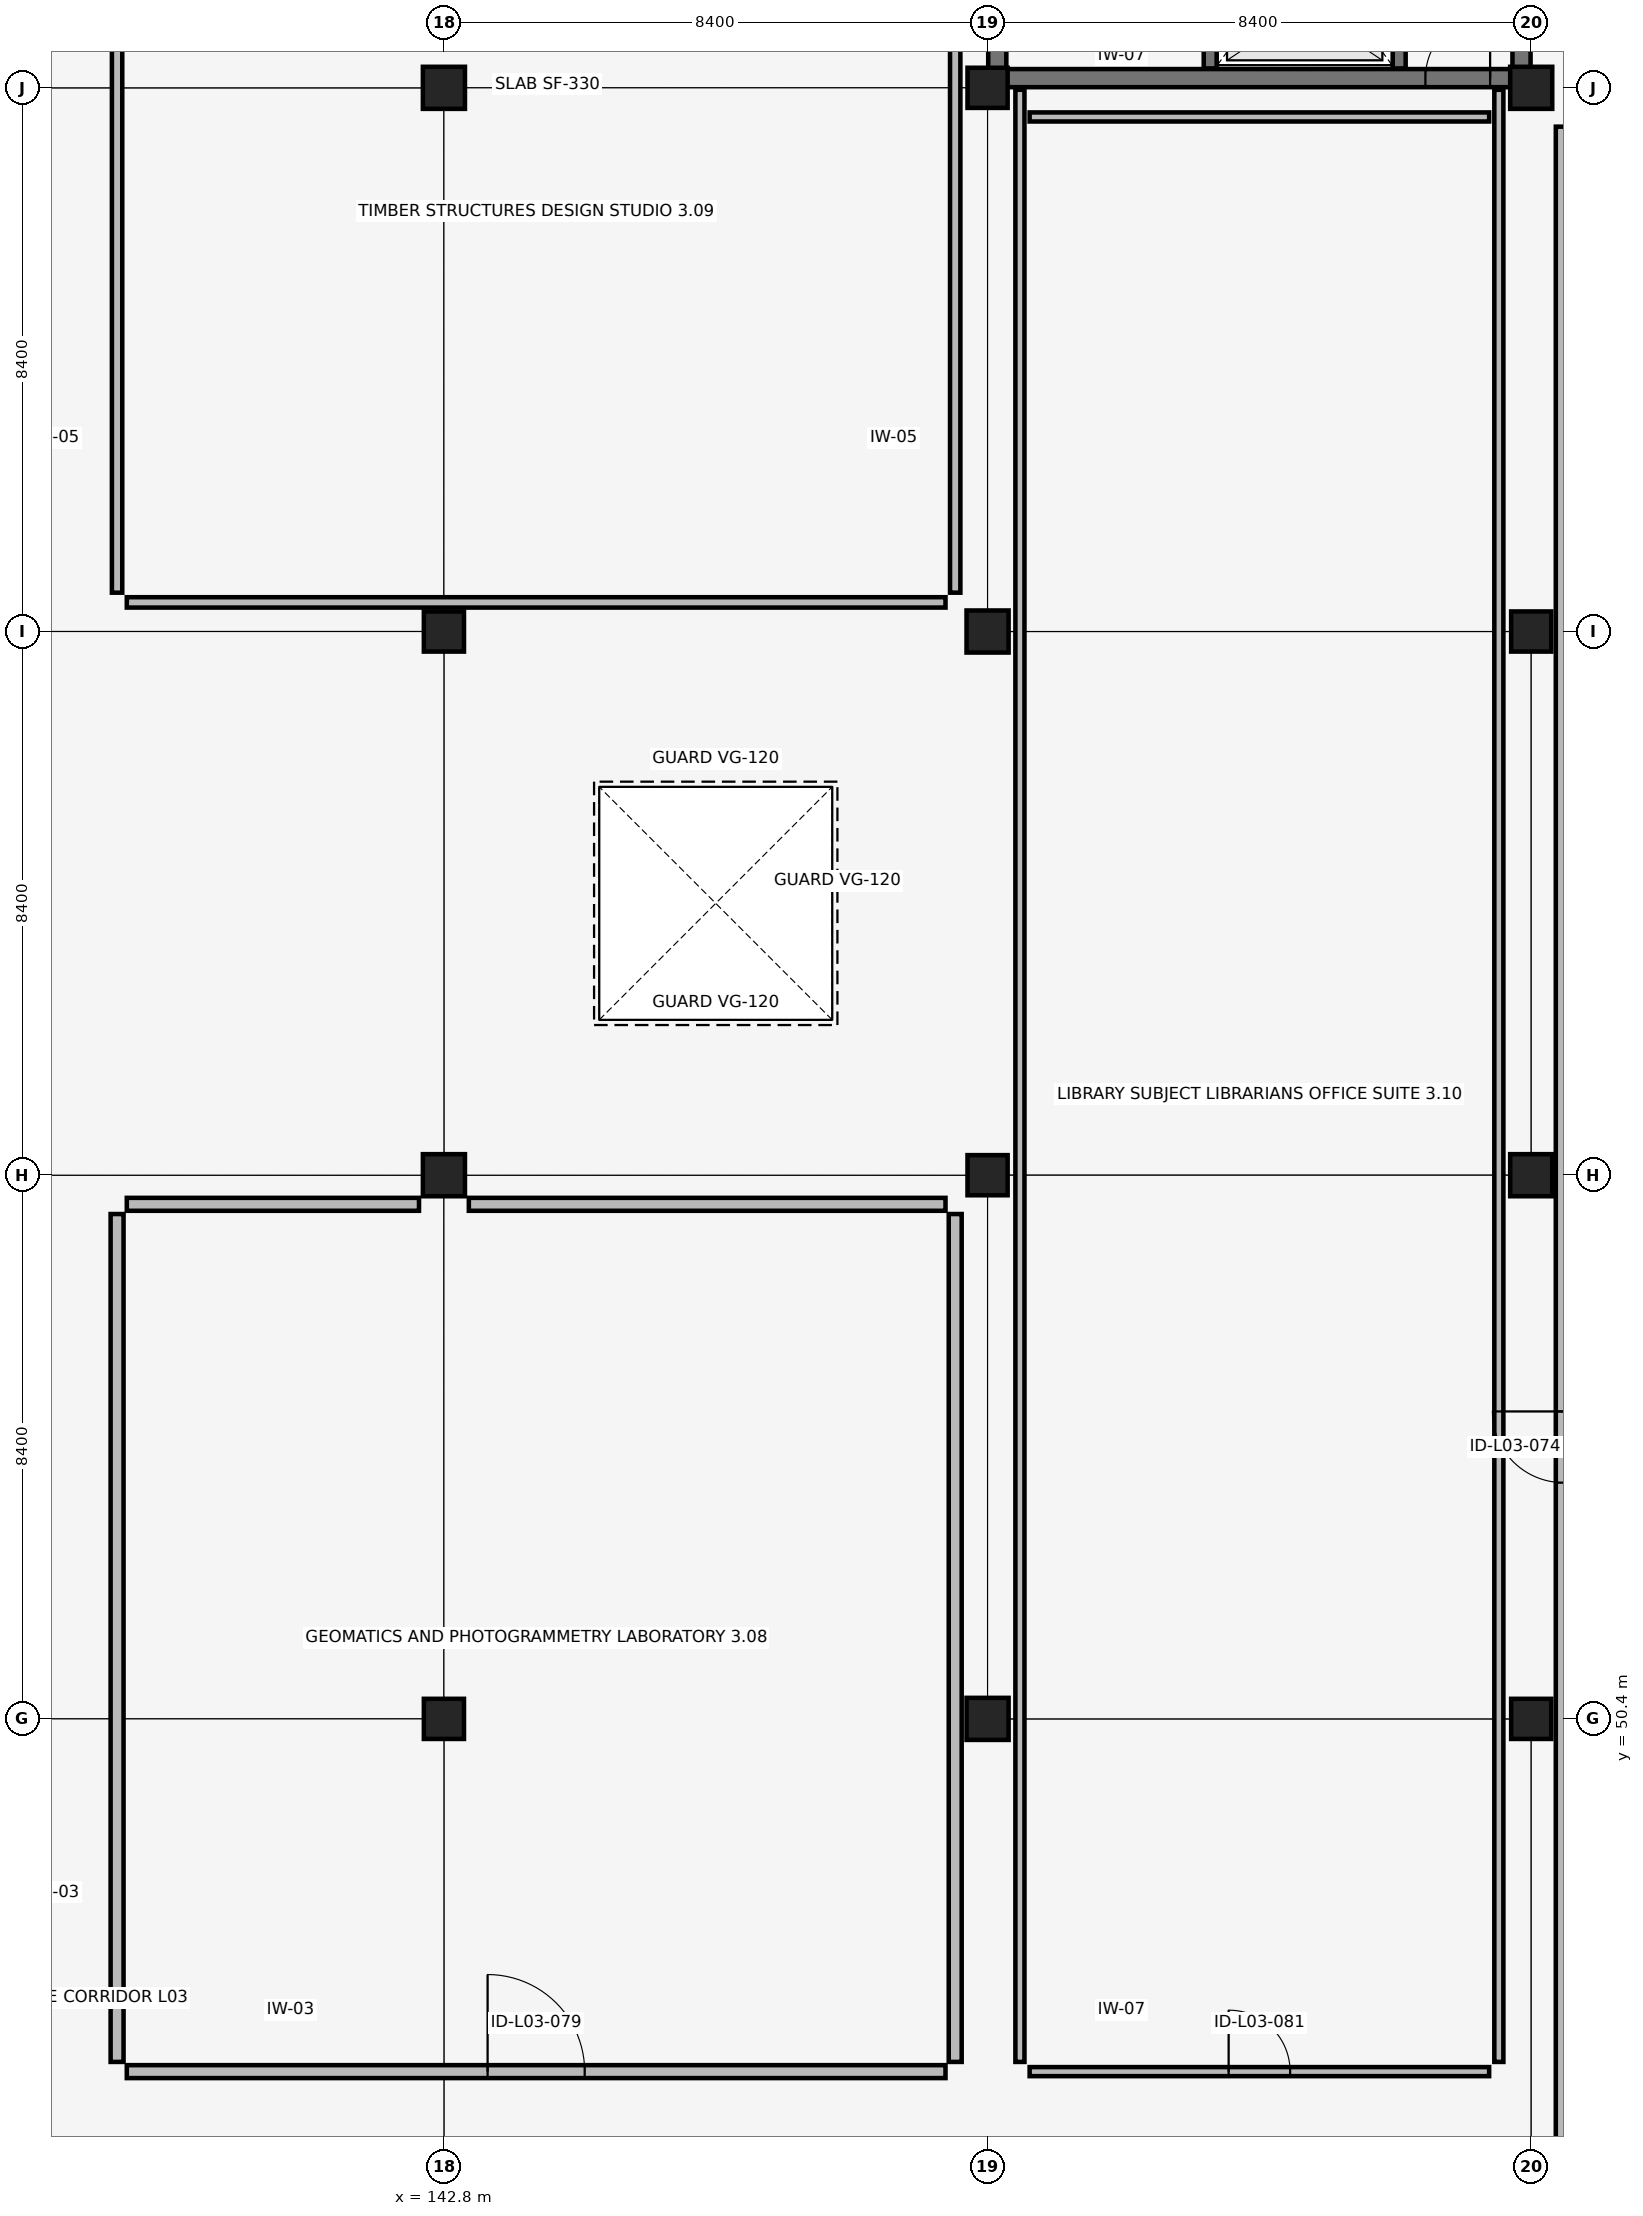
"""IFC4 building model, lengths in metres.
Left out: names, types, materials, properties, quantities, classifications, styles, units other than length and angle.
Written with IfcOpenShell. Run it as: python <this file> out.ifc"""

import sys

from ifc_helpers import new_model, si_unit, direction, frame, frame_2d, origin, origin_2d, place, context, subcontext, project, spatial, rectangle, extrude, element, fill, save


model = new_model("IFC4")
c1 = context("Model", 3, precision=1e-05, world=origin(), true_north=direction((0.0, 1.0)))
c2 = subcontext(c1, "Body", "Model", "MODEL_VIEW")
j1 = project(units=[si_unit("LENGTHUNIT", "METRE"), si_unit("PLANEANGLEUNIT", "RADIAN")], contexts=[c1])
p1 = place(None, origin())
s1 = spatial("IfcSite", under=j1, at=p1, CompositionType="ELEMENT")
p2 = place(p1, origin())
s2 = spatial("IfcBuilding", under=s1, at=p2, CompositionType="ELEMENT")
p3 = place(p2, frame((0.0, 0.0, 13.94)))
s3 = spatial("IfcBuildingStorey", under=s2, at=p3, CompositionType="ELEMENT", Elevation=13.94)
p4 = place(p3, frame((151.35, 75.75, 0.0), z_axis=(0.0, 0.0, 1.0), x_axis=(1.0, 0.0, 0.0)))
e1 = element("IfcWall", 1, at=p4, inside=s3, PredefinedType="SHEAR", context=c2, shape_type="SweptSolid", body=[
    extrude(rectangle(XDim=8.1, YDim=0.28, at=frame_2d((4.05, 0.0))), origin(), (0.0, 0.0, 1.0), 3.78),
])
p5 = place(p4, frame((6.615, 0.0, 0.0)))
e2 = element("IfcOpeningElement", 2, at=p5, cuts=e1, PredefinedType="OPENING", context=c2, shape_type="SweptSolid", body=[
    extrude(rectangle(XDim=1.0, YDim=2.15, at=frame_2d((0.5, 1.075))), frame((0.0, 0.15, 0.0), z_axis=(0.0, -1.0, 0.0), x_axis=(1.0, 0.0, 0.0)), (0.0, 0.0, 1.0), 0.3),
])
p6 = place(p3, frame((151.35, 75.75, 0.0), z_axis=(0.0, 0.0, 1.0), x_axis=(0.0, 1.0, 0.0)))
e3 = element("IfcWall", 3, at=p6, inside=s3, PredefinedType="SHEAR", context=c2, shape_type="SweptSolid", body=[
    extrude(rectangle(XDim=8.1, YDim=0.28, at=frame_2d((4.05, 0.0))), origin(), (0.0, 0.0, 1.0), 3.78),
])
p7 = place(p6, frame((1.325, 0.0, 0.0)))
e4 = element("IfcOpeningElement", 4, at=p7, cuts=e3, PredefinedType="OPENING", context=c2, shape_type="SweptSolid", body=[
    extrude(rectangle(XDim=1.45, YDim=2.15, at=frame_2d((0.725, 1.075))), frame((0.0, 0.15, 0.0), z_axis=(0.0, -1.0, 0.0), x_axis=(1.0, 0.0, 0.0)), (0.0, 0.0, 1.0), 0.3),
])
p8 = place(p3, frame((159.45, 75.75, 0.0), z_axis=(0.0, 0.0, 1.0), x_axis=(0.0, 1.0, 0.0)))
e5 = element("IfcWall", 5, at=p8, inside=s3, PredefinedType="SHEAR", context=c2, shape_type="SweptSolid", body=[
    extrude(rectangle(XDim=8.1, YDim=0.28, at=frame_2d((4.05, 0.0))), origin(), (0.0, 0.0, 1.0), 3.78),
])
p9 = place(p3, frame((142.8, 50.4, 0.0), z_axis=(0.0, 0.0, 1.0), x_axis=(1.0, 0.0, 0.0)))
e6 = element("IfcColumn", 6, at=p9, inside=s3, PredefinedType="COLUMN", context=c2, shape_type="SweptSolid", body=[
    extrude(rectangle(XDim=0.62, YDim=0.62, at=origin_2d()), origin(), (0.0, 0.0, 1.0), 3.78),
])
p10 = place(p3, frame((142.8, 58.8, 0.0), z_axis=(0.0, 0.0, 1.0), x_axis=(1.0, 0.0, 0.0)))
e7 = element("IfcColumn", 7, at=p10, inside=s3, PredefinedType="COLUMN", context=c2, shape_type="SweptSolid", body=[
    extrude(rectangle(XDim=0.65, YDim=0.65, at=origin_2d()), origin(), (0.0, 0.0, 1.0), 3.78),
])
p11 = place(p3, frame((142.8, 67.2, 0.0), z_axis=(0.0, 0.0, 1.0), x_axis=(1.0, 0.0, 0.0)))
e8 = element("IfcColumn", 8, at=p11, inside=s3, PredefinedType="COLUMN", context=c2, shape_type="SweptSolid", body=[
    extrude(rectangle(XDim=0.62, YDim=0.62, at=origin_2d()), origin(), (0.0, 0.0, 1.0), 3.78),
])
for number, where, z_axis, x_axis in (
    (9, (142.8, 75.6, 0.0), (0.0, 0.0, 1.0), (1.0, 0.0, 0.0)),
    (10, (151.2, 50.4, 0.0), (0.0, 0.0, 1.0), (1.0, 0.0, 0.0)),
):
    element("IfcColumn", number, at=place(p3, frame(where, z_axis=z_axis, x_axis=x_axis)), inside=s3, PredefinedType="COLUMN", context=c2, shape_type="SweptSolid", body=[
        extrude(rectangle(XDim=0.65, YDim=0.65, at=origin_2d()), origin(), (0.0, 0.0, 1.0), 3.78),
    ])
p12 = place(p3, frame((151.2, 58.8, 0.0), z_axis=(0.0, 0.0, 1.0), x_axis=(1.0, 0.0, 0.0)))
e11 = element("IfcColumn", 11, at=p12, inside=s3, PredefinedType="COLUMN", context=c2, shape_type="SweptSolid", body=[
    extrude(rectangle(XDim=0.62, YDim=0.62, at=origin_2d()), origin(), (0.0, 0.0, 1.0), 3.78),
])
p13 = place(p3, frame((151.2, 67.2, 0.0), z_axis=(0.0, 0.0, 1.0), x_axis=(1.0, 0.0, 0.0)))
e12 = element("IfcColumn", 12, at=p13, inside=s3, PredefinedType="COLUMN", context=c2, shape_type="SweptSolid", body=[
    extrude(rectangle(XDim=0.65, YDim=0.65, at=origin_2d()), origin(), (0.0, 0.0, 1.0), 3.78),
])
for number, where, z_axis, x_axis in (
    (13, (151.2, 75.6, 0.0), (0.0, 0.0, 1.0), (1.0, 0.0, 0.0)),
    (14, (159.6, 50.4, 0.0), (0.0, 0.0, 1.0), (1.0, 0.0, 0.0)),
):
    element("IfcColumn", number, at=place(p3, frame(where, z_axis=z_axis, x_axis=x_axis)), inside=s3, PredefinedType="COLUMN", context=c2, shape_type="SweptSolid", body=[
        extrude(rectangle(XDim=0.62, YDim=0.62, at=origin_2d()), origin(), (0.0, 0.0, 1.0), 3.78),
    ])
p14 = place(p3, frame((159.6, 58.8, 0.0), z_axis=(0.0, 0.0, 1.0), x_axis=(1.0, 0.0, 0.0)))
e15 = element("IfcColumn", 15, at=p14, inside=s3, PredefinedType="COLUMN", context=c2, shape_type="SweptSolid", body=[
    extrude(rectangle(XDim=0.65, YDim=0.65, at=origin_2d()), origin(), (0.0, 0.0, 1.0), 3.78),
])
p15 = place(p3, frame((159.6, 67.2, 0.0), z_axis=(0.0, 0.0, 1.0), x_axis=(1.0, 0.0, 0.0)))
e16 = element("IfcColumn", 16, at=p15, inside=s3, PredefinedType="COLUMN", context=c2, shape_type="SweptSolid", body=[
    extrude(rectangle(XDim=0.62, YDim=0.62, at=origin_2d()), origin(), (0.0, 0.0, 1.0), 3.78),
])
p16 = place(p3, frame((159.6, 75.6, 0.0), z_axis=(0.0, 0.0, 1.0), x_axis=(1.0, 0.0, 0.0)))
e17 = element("IfcColumn", 17, at=p16, inside=s3, PredefinedType="COLUMN", context=c2, shape_type="SweptSolid", body=[
    extrude(rectangle(XDim=0.65, YDim=0.65, at=origin_2d()), origin(), (0.0, 0.0, 1.0), 3.78),
])
p17 = place(p3, frame((154.64, 75.9, 0.0), z_axis=(0.0, 0.0, 1.0), x_axis=(0.0, 1.0, 0.0)))
e18 = element("IfcWall", 18, at=p17, inside=s3, PredefinedType="SHEAR", context=c2, shape_type="SweptSolid", body=[
    extrude(rectangle(XDim=3.8, YDim=0.2, at=frame_2d((1.9, 0.0))), origin(), (0.0, 0.0, 1.0), 3.78),
])
p18 = place(p17, frame((0.375, 0.0, 0.0)))
e19 = element("IfcOpeningElement", 19, at=p18, cuts=e18, PredefinedType="OPENING", context=c2, shape_type="SweptSolid", body=[
    extrude(rectangle(XDim=1.1, YDim=2.15, at=frame_2d((0.55, 1.075))), frame((0.0, 0.11, 0.0), z_axis=(0.0, -1.0, 0.0), x_axis=(1.0, 0.0, 0.0)), (0.0, 0.0, 1.0), 0.22),
])
p19 = place(p17, frame((2.325, 0.0, 0.0)))
e20 = element("IfcOpeningElement", 20, at=p19, cuts=e18, PredefinedType="OPENING", context=c2, shape_type="SweptSolid", body=[
    extrude(rectangle(XDim=1.1, YDim=2.15, at=frame_2d((0.55, 1.075))), frame((0.0, 0.11, 0.0), z_axis=(0.0, -1.0, 0.0), x_axis=(1.0, 0.0, 0.0)), (0.0, 0.0, 1.0), 0.22),
])
p20 = place(p3, frame((157.56, 75.9, 0.0), z_axis=(0.0, 0.0, 1.0), x_axis=(0.0, 1.0, 0.0)))
e21 = element("IfcWall", 21, at=p20, inside=s3, PredefinedType="SHEAR", context=c2, shape_type="SweptSolid", body=[
    extrude(rectangle(XDim=3.8, YDim=0.2, at=frame_2d((1.9, 0.0))), origin(), (0.0, 0.0, 1.0), 3.78),
])
p21 = place(p3, frame((160.1, 34.2, 0.0), z_axis=(0.0, 0.0, 1.0), x_axis=(0.0, 1.0, 0.0)))
e22 = element("IfcWall", 22, at=p21, inside=s3, PredefinedType="PARTITIONING", context=c2, shape_type="SweptSolid", body=[
    extrude(rectangle(XDim=40.8, YDim=0.24, at=frame_2d((20.4, 0.0))), origin(), (0.0, 0.0, 1.0), 3.05),
])
p22 = place(p21, frame((19.85, 0.0, 0.0)))
e23 = element("IfcOpeningElement", 23, at=p22, cuts=e22, PredefinedType="OPENING", context=c2, shape_type="SweptSolid", body=[
    extrude(rectangle(XDim=1.1, YDim=2.15, at=frame_2d((0.55, 1.075))), frame((0.0, 0.13, 0.0), z_axis=(0.0, -1.0, 0.0), x_axis=(1.0, 0.0, 0.0)), (0.0, 0.0, 1.0), 0.26),
])
p23 = place(p3, frame((137.9, 44.95, 0.0), z_axis=(0.0, 0.0, 1.0), x_axis=(1.0, 0.0, 0.0)))
e24 = element("IfcWall", 24, at=p23, inside=s3, PredefinedType="PARTITIONING", context=c2, shape_type="SweptSolid", body=[
    extrude(rectangle(XDim=12.65, YDim=0.2, at=frame_2d((6.325, 0.0))), origin(), (0.0, 0.0, 1.0), 3.35),
])
p24 = place(p23, frame((5.575, 0.0, 0.0)))
e25 = element("IfcOpeningElement", 25, at=p24, cuts=e24, PredefinedType="OPENING", context=c2, shape_type="SweptSolid", body=[
    extrude(rectangle(XDim=1.5, YDim=2.2, at=frame_2d((0.75, 1.1))), frame((0.0, 0.11, 0.0), z_axis=(0.0, -1.0, 0.0), x_axis=(1.0, 0.0, 0.0)), (0.0, 0.0, 1.0), 0.22),
])
p25 = place(p3, frame((137.75, 45.1, 0.0), z_axis=(0.0, 0.0, 1.0), x_axis=(0.0, 1.0, 0.0)))
e26 = element("IfcWall", 26, at=p25, inside=s3, PredefinedType="PARTITIONING", context=c2, shape_type="SweptSolid", body=[
    extrude(rectangle(XDim=13.1, YDim=0.2, at=frame_2d((6.55, 0.0))), origin(), (0.0, 0.0, 1.0), 3.05),
])
p26 = place(p3, frame((137.9, 58.35, 0.0), z_axis=(0.0, 0.0, 1.0), x_axis=(1.0, 0.0, 0.0)))
e27 = element("IfcWall", 27, at=p26, inside=s3, PredefinedType="PARTITIONING", context=c2, shape_type="SweptSolid", body=[
    extrude(rectangle(XDim=4.515, YDim=0.2, at=frame_2d((2.258, 0.0))), origin(), (0.0, 0.0, 1.0), 3.78),
])
p27 = place(p3, frame((143.185, 58.35, 0.0), z_axis=(0.0, 0.0, 1.0), x_axis=(1.0, 0.0, 0.0)))
e28 = element("IfcWall", 28, at=p27, inside=s3, PredefinedType="PARTITIONING", context=c2, shape_type="SweptSolid", body=[
    extrude(rectangle(XDim=7.365, YDim=0.2, at=frame_2d((3.683, 0.0))), origin(), (0.0, 0.0, 1.0), 3.78),
])
p28 = place(p3, frame((150.7, 45.1, 0.0), z_axis=(0.0, 0.0, 1.0), x_axis=(0.0, 1.0, 0.0)))
e29 = element("IfcWall", 29, at=p28, inside=s3, PredefinedType="PARTITIONING", context=c2, shape_type="SweptSolid", body=[
    extrude(rectangle(XDim=13.1, YDim=0.2, at=frame_2d((6.55, 0.0))), origin(), (0.0, 0.0, 1.0), 3.05),
])
for number, where, z_axis, x_axis in (
    (30, (137.75, 67.8, 0.0), (0.0, 0.0, 1.0), (0.0, 1.0, 0.0)),
    (31, (150.7, 67.8, 0.0), (0.0, 0.0, 1.0), (0.0, 1.0, 0.0)),
):
    element("IfcWall", number, at=place(p3, frame(where, z_axis=z_axis, x_axis=x_axis)), inside=s3, PredefinedType="PARTITIONING", context=c2, shape_type="SweptSolid", body=[
        extrude(rectangle(XDim=15.6, YDim=0.16, at=frame_2d((7.8, 0.0))), origin(), (0.0, 0.0, 1.0), 3.13),
    ])
p29 = place(p3, frame((137.9, 67.65, 0.0), z_axis=(0.0, 0.0, 1.0), x_axis=(1.0, 0.0, 0.0)))
e32 = element("IfcWall", 32, at=p29, inside=s3, PredefinedType="PARTITIONING", context=c2, shape_type="SweptSolid", body=[
    extrude(rectangle(XDim=12.65, YDim=0.16, at=frame_2d((6.325, 0.0))), origin(), (0.0, 0.0, 1.0), 3.35),
])
p30 = place(p3, frame((151.85, 44.95, 0.0), z_axis=(0.0, 0.0, 1.0), x_axis=(1.0, 0.0, 0.0)))
e33 = element("IfcWall", 33, at=p30, inside=s3, PredefinedType="PARTITIONING", context=c2, shape_type="SweptSolid", body=[
    extrude(rectangle(XDim=7.1, YDim=0.14, at=frame_2d((3.55, 0.0))), origin(), (0.0, 0.0, 1.0), 3.78),
])
p31 = place(p30, frame((3.075, 0.0, 0.0)))
e34 = element("IfcOpeningElement", 34, at=p31, cuts=e33, PredefinedType="OPENING", context=c2, shape_type="SweptSolid", body=[
    extrude(rectangle(XDim=0.95, YDim=2.1, at=frame_2d((0.475, 1.05))), frame((0.0, 0.08, 0.0), z_axis=(0.0, -1.0, 0.0), x_axis=(1.0, 0.0, 0.0)), (0.0, 0.0, 1.0), 0.16),
])
p32 = place(p3, frame((151.85, 75.15, 0.0), z_axis=(0.0, 0.0, 1.0), x_axis=(1.0, 0.0, 0.0)))
e35 = element("IfcWall", 35, at=p32, inside=s3, PredefinedType="PARTITIONING", context=c2, shape_type="SweptSolid", body=[
    extrude(rectangle(XDim=7.1, YDim=0.14, at=frame_2d((3.55, 0.0))), origin(), (0.0, 0.0, 1.0), 3.78),
])
for number, where, z_axis, x_axis in (
    (36, (151.7, 45.1, 0.0), (0.0, 0.0, 1.0), (0.0, 1.0, 0.0)),
    (37, (159.1, 45.1, 0.0), (0.0, 0.0, 1.0), (0.0, 1.0, 0.0)),
):
    element("IfcWall", number, at=place(p3, frame(where, z_axis=z_axis, x_axis=x_axis)), inside=s3, PredefinedType="PARTITIONING", context=c2, shape_type="SweptSolid", body=[
        extrude(rectangle(XDim=30.47, YDim=0.14, at=frame_2d((15.235, 0.0))), origin(), (0.0, 0.0, 1.0), 3.05),
    ])
p33 = place(p5, origin())
e38 = element("IfcDoor", 38, at=p33, inside=s3, OperationType="SINGLE_SWING_RIGHT", PredefinedType="DOOR", context=c2, shape_type="SweptSolid", body=[
    extrude(rectangle(XDim=1.0, YDim=2.15, at=frame_2d((0.5, 1.075))), frame((0.0, 0.025, 0.0), z_axis=(0.0, -1.0, 0.0), x_axis=(1.0, 0.0, 0.0)), (0.0, 0.0, 1.0), 0.05),
])
fill(e2, e38)
p34 = place(p22, origin())
e39 = element("IfcDoor", 39, at=p34, inside=s3, OperationType="SINGLE_SWING_RIGHT", PredefinedType="DOOR", context=c2, shape_type="SweptSolid", body=[
    extrude(rectangle(XDim=1.1, YDim=2.15, at=frame_2d((0.55, 1.075))), frame((0.0, 0.025, 0.0), z_axis=(0.0, -1.0, 0.0), x_axis=(1.0, 0.0, 0.0)), (0.0, 0.0, 1.0), 0.05),
])
fill(e23, e39)
p35 = place(p24, origin())
e40 = element("IfcDoor", 40, at=p35, inside=s3, OperationType="DOUBLE_DOOR_SINGLE_SWING", PredefinedType="DOOR", context=c2, shape_type="SweptSolid", body=[
    extrude(rectangle(XDim=1.5, YDim=2.2, at=frame_2d((0.75, 1.1))), frame((0.0, 0.025, 0.0), z_axis=(0.0, -1.0, 0.0), x_axis=(1.0, 0.0, 0.0)), (0.0, 0.0, 1.0), 0.05),
])
fill(e25, e40)
p36 = place(p31, origin())
e41 = element("IfcDoor", 41, at=p36, inside=s3, OperationType="SINGLE_SWING_LEFT", PredefinedType="DOOR", context=c2, shape_type="SweptSolid", body=[
    extrude(rectangle(XDim=0.95, YDim=2.1, at=frame_2d((0.475, 1.05))), frame((0.0, 0.025, 0.0), z_axis=(0.0, -1.0, 0.0), x_axis=(1.0, 0.0, 0.0)), (0.0, 0.0, 1.0), 0.05),
])
fill(e34, e41)
save(model, sys.argv[1])
